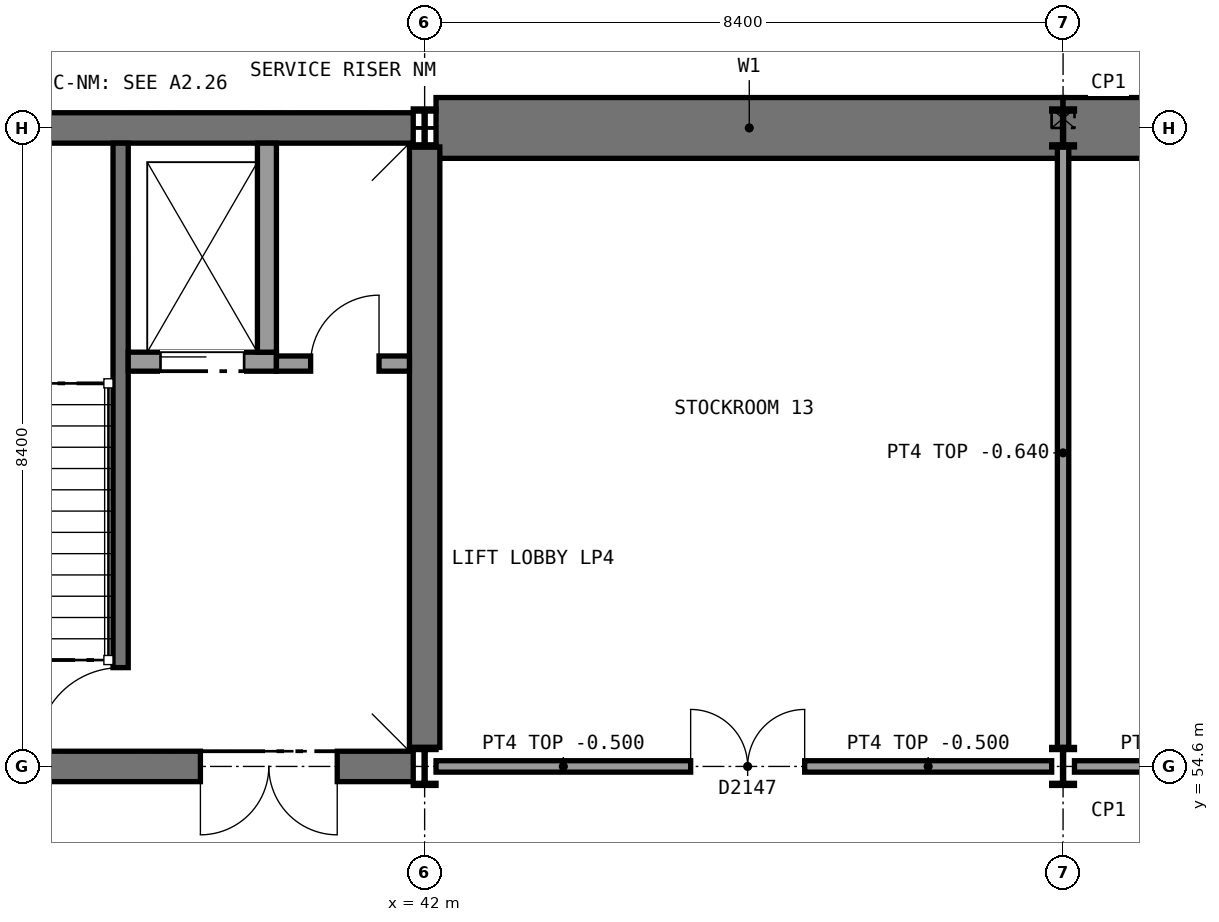
"""IFC4 building model, lengths in metres.
Left out: names, types, materials, properties, quantities, classifications, styles, units other than length and angle.
Written with IfcOpenShell. Run it as: python <this file> out.ifc"""

import sys

from ifc_helpers import new_model, si_unit, direction, frame, frame_2d, origin, origin_2d, place, context, subcontext, project, spatial, rectangle, i_section, extrude, element, fill, save


model = new_model("IFC4")
c1 = context("Model", 3, precision=1e-05, world=origin(), true_north=direction((0.0, 1.0)))
c2 = subcontext(c1, "Body", "Model", "MODEL_VIEW")
j1 = project(units=[si_unit("LENGTHUNIT", "METRE"), si_unit("PLANEANGLEUNIT", "RADIAN")], contexts=[c1])
p1 = place(None, origin())
s1 = spatial("IfcSite", under=j1, at=p1, CompositionType="ELEMENT")
p2 = place(p1, origin())
s2 = spatial("IfcBuilding", under=s1, at=p2, CompositionType="ELEMENT")
p3 = place(p2, frame((0.0, 0.0, -4.9)))
s3 = spatial("IfcBuildingStorey", under=s2, at=p3, CompositionType="ELEMENT", Elevation=-4.9)
p4 = place(p3, frame((42.15, 63.0, 0.0), z_axis=(0.0, 0.0, 1.0), x_axis=(1.0, 0.0, 0.0)))
e1 = element("IfcWall", 1, at=p4, inside=s3, PredefinedType="SOLIDWALL", context=c2, shape_type="SweptSolid", body=[
    extrude(rectangle(XDim=8.25, YDim=0.8, at=frame_2d((4.125, 0.0))), origin(), (0.0, 0.0, 1.0), 4.75),
])
p5 = place(p3, frame((50.4, 63.0, 0.0), z_axis=(0.0, 0.0, 1.0), x_axis=(1.0, 0.0, 0.0)))
e2 = element("IfcWall", 2, at=p5, inside=s3, PredefinedType="SOLIDWALL", context=c2, shape_type="SweptSolid", body=[
    extrude(rectangle(XDim=8.25, YDim=0.8, at=frame_2d((4.125, 0.0))), origin(), (0.0, 0.0, 1.0), 4.75),
])
p6 = place(p3, frame((33.75, 63.0, 0.0), z_axis=(0.0, 0.0, 1.0), x_axis=(1.0, 0.0, 0.0)))
e3 = element("IfcWall", 3, at=p6, inside=s3, PredefinedType="SHEAR", context=c2, shape_type="SweptSolid", body=[
    extrude(rectangle(XDim=8.1, YDim=0.4, at=frame_2d((4.05, 0.0))), origin(), (0.0, 0.0, 1.0), 4.75),
])
p7 = place(p3, frame((33.75, 54.6, 0.0), z_axis=(0.0, 0.0, 1.0), x_axis=(1.0, 0.0, 0.0)))
e4 = element("IfcWall", 4, at=p7, inside=s3, PredefinedType="SHEAR", context=c2, shape_type="SweptSolid", body=[
    extrude(rectangle(XDim=8.1, YDim=0.4, at=frame_2d((4.05, 0.0))), origin(), (0.0, 0.0, 1.0), 4.75),
])
p8 = place(p7, frame((1.15, 0.0, 0.0)))
e5 = element("IfcOpeningElement", 5, at=p8, cuts=e4, PredefinedType="OPENING", context=c2, shape_type="SweptSolid", body=[
    extrude(rectangle(XDim=1.8, YDim=2.1, at=frame_2d((0.9, 1.05))), frame((0.0, 0.21, 0.0), z_axis=(0.0, -1.0, 0.0), x_axis=(1.0, 0.0, 0.0)), (0.0, 0.0, 1.0), 0.42),
])
p9 = place(p7, frame((5.3, 0.0, 0.0)))
e6 = element("IfcOpeningElement", 6, at=p9, cuts=e4, PredefinedType="OPENING", context=c2, shape_type="SweptSolid", body=[
    extrude(rectangle(XDim=1.8, YDim=2.1, at=frame_2d((0.9, 1.05))), frame((0.0, 0.21, 0.0), z_axis=(0.0, -1.0, 0.0), x_axis=(1.0, 0.0, 0.0)), (0.0, 0.0, 1.0), 0.42),
])
p10 = place(p3, frame((42.0, 54.85, 0.0), z_axis=(0.0, 0.0, 1.0), x_axis=(0.0, 1.0, 0.0)))
e7 = element("IfcWall", 7, at=p10, inside=s3, PredefinedType="SHEAR", context=c2, shape_type="SweptSolid", body=[
    extrude(rectangle(XDim=7.9, YDim=0.4, at=frame_2d((3.95, 0.0))), origin(), (0.0, 0.0, 1.0), 4.75),
])
for number, where, z_axis, x_axis in (
    (8, (42.0, 54.6, 0.0), (0.0, 0.0, 1.0), (1.0, 0.0, 0.0)),
    (9, (42.0, 63.0, 0.0), (0.0, 0.0, 1.0), (1.0, 0.0, 0.0)),
    (10, (50.4, 54.6, 0.0), (0.0, 0.0, 1.0), (1.0, 0.0, 0.0)),
    (11, (50.4, 63.0, 0.0), (0.0, 0.0, 1.0), (1.0, 0.0, 0.0)),
):
    element("IfcColumn", number, at=place(p3, frame(where, z_axis=z_axis, x_axis=x_axis)), inside=s3, PredefinedType="COLUMN", context=c2, shape_type="SweptSolid", body=[
        extrude(i_section(OverallWidth=0.3, OverallDepth=0.5, WebThickness=0.014, FlangeThickness=0.028, FilletRadius=0.027, at=origin_2d()), origin(), (0.0, 0.0, 1.0), 4.9),
    ])
p11 = place(p3, frame((42.15, 54.6, 0.0), z_axis=(0.0, 0.0, 1.0), x_axis=(1.0, 0.0, 0.0)))
e12 = element("IfcWall", 12, at=p11, inside=s3, PredefinedType="SOLIDWALL", context=c2, shape_type="SweptSolid", body=[
    extrude(rectangle(XDim=8.1, YDim=0.15, at=frame_2d((4.05, 0.0))), origin(), (0.0, 0.0, 1.0), 4.4),
])
p12 = place(p11, frame((3.35, 0.0, 0.0)))
e13 = element("IfcOpeningElement", 13, at=p12, cuts=e12, PredefinedType="OPENING", context=c2, shape_type="SweptSolid", body=[
    extrude(rectangle(XDim=1.5, YDim=2.1, at=frame_2d((0.75, 1.05))), frame((0.0, 0.085, 0.0), z_axis=(0.0, -1.0, 0.0), x_axis=(1.0, 0.0, 0.0)), (0.0, 0.0, 1.0), 0.17),
])
p13 = place(p3, frame((50.55, 54.6, 0.0), z_axis=(0.0, 0.0, 1.0), x_axis=(1.0, 0.0, 0.0)))
e14 = element("IfcWall", 14, at=p13, inside=s3, PredefinedType="SOLIDWALL", context=c2, shape_type="SweptSolid", body=[
    extrude(rectangle(XDim=8.1, YDim=0.15, at=frame_2d((4.05, 0.0))), origin(), (0.0, 0.0, 1.0), 4.4),
])
p14 = place(p13, frame((3.35, 0.0, 0.0)))
e15 = element("IfcOpeningElement", 15, at=p14, cuts=e14, PredefinedType="OPENING", context=c2, shape_type="SweptSolid", body=[
    extrude(rectangle(XDim=1.5, YDim=2.1, at=frame_2d((0.75, 1.05))), frame((0.0, 0.085, 0.0), z_axis=(0.0, -1.0, 0.0), x_axis=(1.0, 0.0, 0.0)), (0.0, 0.0, 1.0), 0.17),
])
p15 = place(p3, frame((50.4, 54.85, 0.0), z_axis=(0.0, 0.0, 1.0), x_axis=(0.0, 1.0, 0.0)))
e16 = element("IfcWall", 16, at=p15, inside=s3, PredefinedType="SOLIDWALL", context=c2, shape_type="SweptSolid", body=[
    extrude(rectangle(XDim=7.9, YDim=0.15, at=frame_2d((3.95, 0.0))), origin(), (0.0, 0.0, 1.0), 4.26),
])
p16 = place(p3, frame((38.0, 62.8, 0.0), z_axis=(0.0, 0.0, 1.0), x_axis=(0.0, -1.0, 0.0)))
e17 = element("IfcWall", 17, at=p16, inside=s3, PredefinedType="SHEAR", context=c2, shape_type="SweptSolid", body=[
    extrude(rectangle(XDim=8.0, YDim=0.2, at=frame_2d((4.0, 0.0))), origin(), (0.0, 0.0, 1.0), 4.75),
])
p17 = place(p16, frame((6.9, 0.0, 0.0)))
e18 = element("IfcOpeningElement", 18, at=p17, cuts=e17, PredefinedType="OPENING", context=c2, shape_type="SweptSolid", body=[
    extrude(rectangle(XDim=1.11, YDim=2.1, at=frame_2d((0.555, 1.05))), frame((0.0, 0.11, 0.0), z_axis=(0.0, -1.0, 0.0), x_axis=(1.0, 0.0, 0.0)), (0.0, 0.0, 1.0), 0.22),
])
p18 = place(p3, frame((38.1, 59.925, 0.0), z_axis=(0.0, 0.0, 1.0), x_axis=(1.0, 0.0, 0.0)))
e19 = element("IfcWall", 19, at=p18, inside=s3, PredefinedType="SOLIDWALL", context=c2, shape_type="SweptSolid", body=[
    extrude(rectangle(XDim=1.95, YDim=0.25, at=frame_2d((0.975, 0.0))), origin(), (0.0, 0.0, 1.0), 4.9),
])
p19 = place(p18, frame((0.425, 0.0, 0.0)))
e20 = element("IfcOpeningElement", 20, at=p19, cuts=e19, PredefinedType="OPENING", context=c2, shape_type="SweptSolid", body=[
    extrude(rectangle(XDim=1.1, YDim=2.1, at=frame_2d((0.55, 1.05))), frame((0.0, 0.135, 0.0), z_axis=(0.0, -1.0, 0.0), x_axis=(1.0, 0.0, 0.0)), (0.0, 0.0, 1.0), 0.27),
])
p20 = place(p3, frame((39.925, 62.8, 0.0), z_axis=(0.0, 0.0, 1.0), x_axis=(0.0, -1.0, 0.0)))
e21 = element("IfcWall", 21, at=p20, inside=s3, PredefinedType="SOLIDWALL", context=c2, shape_type="SweptSolid", body=[
    extrude(rectangle(XDim=2.75, YDim=0.25, at=frame_2d((1.375, 0.0))), origin(), (0.0, 0.0, 1.0), 4.9),
])
p21 = place(p3, frame((40.05, 59.9, 0.0), z_axis=(0.0, 0.0, 1.0), x_axis=(1.0, 0.0, 0.0)))
e22 = element("IfcWall", 22, at=p21, inside=s3, PredefinedType="PARTITIONING", context=c2, shape_type="SweptSolid", body=[
    extrude(rectangle(XDim=1.75, YDim=0.2, at=frame_2d((0.875, 0.0))), origin(), (0.0, 0.0, 1.0), 4.75),
])
p22 = place(p21, frame((0.45, 0.0, 0.0)))
e23 = element("IfcOpeningElement", 23, at=p22, cuts=e22, PredefinedType="OPENING", context=c2, shape_type="SweptSolid", body=[
    extrude(rectangle(XDim=0.9, YDim=2.1, at=frame_2d((0.45, 1.05))), frame((0.0, 0.11, 0.0), z_axis=(0.0, -1.0, 0.0), x_axis=(1.0, 0.0, 0.0)), (0.0, 0.0, 1.0), 0.22),
])
p23 = place(p12, origin())
e24 = element("IfcDoor", 24, at=p23, inside=s3, OperationType="DOUBLE_DOOR_SINGLE_SWING", PredefinedType="DOOR", context=c2, shape_type="SweptSolid", body=[
    extrude(rectangle(XDim=1.5, YDim=2.1, at=frame_2d((0.75, 1.05))), frame((0.0, 0.025, 0.0), z_axis=(0.0, -1.0, 0.0), x_axis=(1.0, 0.0, 0.0)), (0.0, 0.0, 1.0), 0.05),
])
fill(e13, e24)
p24 = place(p17, frame((1.1, 0.0, 0.0), z_axis=(0.0, 0.0, 1.0), x_axis=(-1.0, 0.0, 0.0)))
e25 = element("IfcDoor", 25, at=p24, inside=s3, OperationType="SINGLE_SWING_LEFT", PredefinedType="DOOR", context=c2, shape_type="SweptSolid", body=[
    extrude(rectangle(XDim=1.1, YDim=2.1, at=frame_2d((0.55, 1.05))), frame((0.0, 0.025, 0.0), z_axis=(0.0, -1.0, 0.0), x_axis=(1.0, 0.0, 0.0)), (0.0, 0.0, 1.0), 0.05),
])
fill(e18, e25)
p25 = place(p19, frame((1.1, 0.0, 0.0), z_axis=(0.0, 0.0, 1.0), x_axis=(-1.0, 0.0, 0.0)))
e26 = element("IfcDoor", 26, at=p25, inside=s3, OperationType="SLIDING_TO_RIGHT", PredefinedType="DOOR", context=c2, shape_type="SweptSolid", body=[
    extrude(rectangle(XDim=1.1, YDim=2.1, at=frame_2d((0.55, 1.05))), frame((0.0, 0.025, 0.0), z_axis=(0.0, -1.0, 0.0), x_axis=(1.0, 0.0, 0.0)), (0.0, 0.0, 1.0), 0.05),
])
fill(e20, e26)
p26 = place(p22, origin())
e27 = element("IfcDoor", 27, at=p26, inside=s3, OperationType="SINGLE_SWING_RIGHT", PredefinedType="DOOR", context=c2, shape_type="SweptSolid", body=[
    extrude(rectangle(XDim=0.9, YDim=2.1, at=frame_2d((0.45, 1.05))), frame((0.0, 0.025, 0.0), z_axis=(0.0, -1.0, 0.0), x_axis=(1.0, 0.0, 0.0)), (0.0, 0.0, 1.0), 0.05),
])
fill(e23, e27)
p27 = place(p9, frame((1.8, 0.0, 0.0), z_axis=(0.0, 0.0, 1.0), x_axis=(-1.0, 0.0, 0.0)))
e28 = element("IfcDoor", 28, at=p27, inside=s3, OperationType="DOUBLE_DOOR_SINGLE_SWING", PredefinedType="DOOR", context=c2, shape_type="SweptSolid", body=[
    extrude(rectangle(XDim=1.8, YDim=2.1, at=frame_2d((0.9, 1.05))), frame((0.0, 0.025, 0.0), z_axis=(0.0, -1.0, 0.0), x_axis=(1.0, 0.0, 0.0)), (0.0, 0.0, 1.0), 0.05),
])
fill(e6, e28)
save(model, sys.argv[1])
